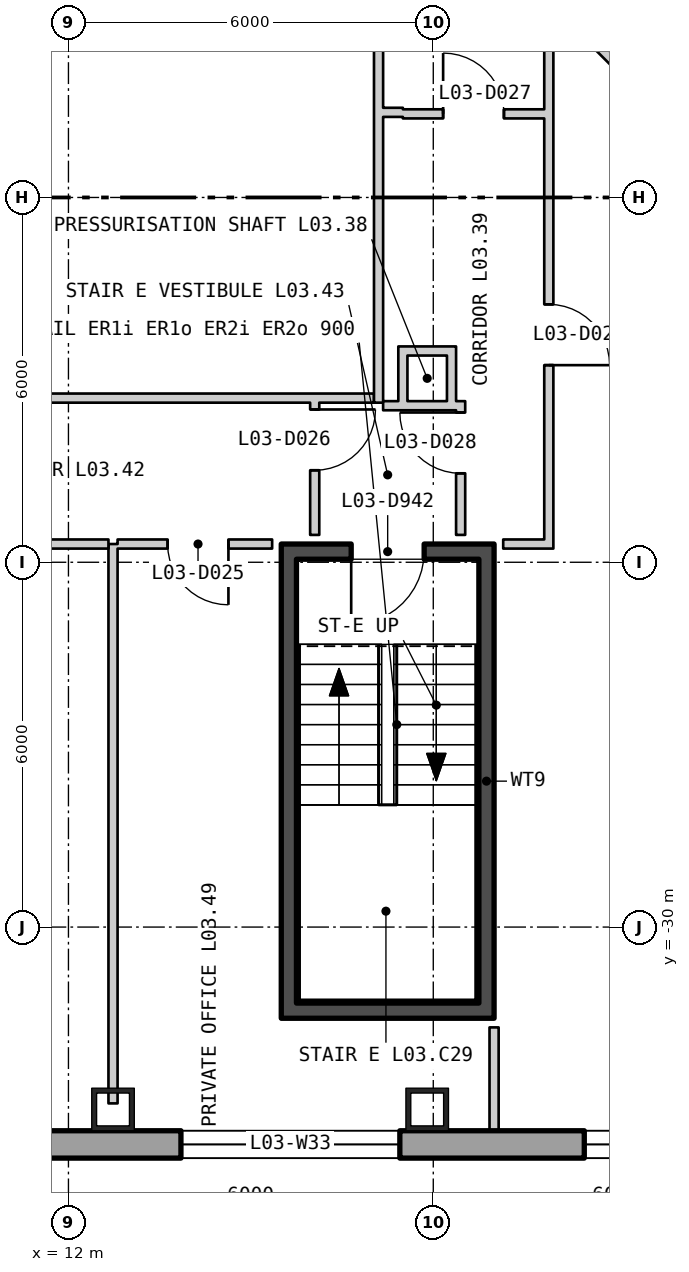
"""IFC4 building model, lengths in metres.
Left out: names, types, materials, properties, quantities, classifications, styles, units other than length and angle.
Written with IfcOpenShell. Run it as: python <this file> out.ifc"""

import sys

from ifc_helpers import new_model, si_unit, direction, frame, frame_2d, origin, origin_2d, place, context, subcontext, project, spatial, polyline, rectangle, hollow_rectangle, outline, extrude, element, fill, save


model = new_model("IFC4")
c1 = context("Model", 3, precision=1e-05, world=origin(), true_north=direction((0.0, 1.0)))
c2 = subcontext(c1, "Body", "Model", "MODEL_VIEW")
j1 = project(units=[si_unit("LENGTHUNIT", "METRE"), si_unit("PLANEANGLEUNIT", "RADIAN")], contexts=[c1])
p1 = place(None, origin())
s1 = spatial("IfcSite", under=j1, at=p1, CompositionType="ELEMENT")
p2 = place(p1, origin())
s2 = spatial("IfcBuilding", under=s1, at=p2, CompositionType="ELEMENT")
p3 = place(p2, frame((0.0, 0.0, 18.6)))
s3 = spatial("IfcBuildingStorey", under=s2, at=p3, CompositionType="ELEMENT", Elevation=18.6)
for number, where, z_axis, x_axis in (
    (1, (12.733, -33.0, 0.0), (0.0, 0.0, 1.0), (1.0, 0.0, 0.0)),
    (2, (17.9, -33.0, 0.0), (0.0, 0.0, 1.0), (1.0, 0.0, 0.0)),
):
    element("IfcColumn", number, at=place(p3, frame(where, z_axis=z_axis, x_axis=x_axis)), inside=s3, PredefinedType="COLUMN", context=c2, shape_type="SweptSolid", body=[
        extrude(hollow_rectangle(XDim=0.7, YDim=0.7, WallThickness=0.08, at=origin_2d()), origin(), (0.0, 0.0, 1.0), 5.1),
    ])
p4 = place(p3, frame((-38.775, -33.575, -0.4), z_axis=(0.0, 0.0, 1.0), x_axis=(1.0, 0.0, 0.0)))
e3 = element("IfcWall", 3, at=p4, inside=s3, PredefinedType="SOLIDWALL", context=c2, shape_type="SweptSolid", body=[
    extrude(outline(polyline([(-0.225, -0.225), (77.775, -0.225), (77.325, 0.225), (0.225, 0.225), (-0.225, -0.225)])), origin(), (0.0, 0.0, 1.0), 5.1),
])
p5 = place(p4, frame((1.958, 0.0, 1.3)))
e4 = element("IfcOpeningElement", 4, at=p5, cuts=e3, PredefinedType="OPENING", context=c2, shape_type="SweptSolid", body=[
    extrude(rectangle(XDim=3.6, YDim=3.2, at=frame_2d((1.8, 1.6))), frame((0.0, 0.235, 0.0), z_axis=(0.0, -1.0, 0.0), x_axis=(1.0, 0.0, 0.0)), (0.0, 0.0, 1.0), 0.47),
])
p6 = place(p4, frame((8.325, 0.0, 1.3)))
e5 = element("IfcOpeningElement", 5, at=p6, cuts=e3, PredefinedType="OPENING", context=c2, shape_type="SweptSolid", body=[
    extrude(rectangle(XDim=3.6, YDim=3.2, at=frame_2d((1.8, 1.6))), frame((0.0, 0.235, 0.0), z_axis=(0.0, -1.0, 0.0), x_axis=(1.0, 0.0, 0.0)), (0.0, 0.0, 1.0), 0.47),
])
p7 = place(p4, frame((14.692, 0.0, 1.3)))
e6 = element("IfcOpeningElement", 6, at=p7, cuts=e3, PredefinedType="OPENING", context=c2, shape_type="SweptSolid", body=[
    extrude(rectangle(XDim=3.6, YDim=3.2, at=frame_2d((1.8, 1.6))), frame((0.0, 0.235, 0.0), z_axis=(0.0, -1.0, 0.0), x_axis=(1.0, 0.0, 0.0)), (0.0, 0.0, 1.0), 0.47),
])
p8 = place(p4, frame((21.325, 0.0, 1.3)))
e7 = element("IfcOpeningElement", 7, at=p8, cuts=e3, PredefinedType="OPENING", context=c2, shape_type="SweptSolid", body=[
    extrude(rectangle(XDim=3.6, YDim=3.2, at=frame_2d((1.8, 1.6))), frame((0.0, 0.235, 0.0), z_axis=(0.0, -1.0, 0.0), x_axis=(1.0, 0.0, 0.0)), (0.0, 0.0, 1.0), 0.47),
])
p9 = place(p4, frame((27.425, 0.0, 1.3)))
e8 = element("IfcOpeningElement", 8, at=p9, cuts=e3, PredefinedType="OPENING", context=c2, shape_type="SweptSolid", body=[
    extrude(rectangle(XDim=3.6, YDim=3.2, at=frame_2d((1.8, 1.6))), frame((0.0, 0.235, 0.0), z_axis=(0.0, -1.0, 0.0), x_axis=(1.0, 0.0, 0.0)), (0.0, 0.0, 1.0), 0.47),
])
p10 = place(p4, frame((33.792, 0.0, 1.3)))
e9 = element("IfcOpeningElement", 9, at=p10, cuts=e3, PredefinedType="OPENING", context=c2, shape_type="SweptSolid", body=[
    extrude(rectangle(XDim=3.6, YDim=3.2, at=frame_2d((1.8, 1.6))), frame((0.0, 0.235, 0.0), z_axis=(0.0, -1.0, 0.0), x_axis=(1.0, 0.0, 0.0)), (0.0, 0.0, 1.0), 0.47),
])
p11 = place(p4, frame((40.158, 0.0, 1.3)))
e10 = element("IfcOpeningElement", 10, at=p11, cuts=e3, PredefinedType="OPENING", context=c2, shape_type="SweptSolid", body=[
    extrude(rectangle(XDim=3.6, YDim=3.2, at=frame_2d((1.8, 1.6))), frame((0.0, 0.235, 0.0), z_axis=(0.0, -1.0, 0.0), x_axis=(1.0, 0.0, 0.0)), (0.0, 0.0, 1.0), 0.47),
])
p12 = place(p4, frame((46.525, 0.0, 1.3)))
e11 = element("IfcOpeningElement", 11, at=p12, cuts=e3, PredefinedType="OPENING", context=c2, shape_type="SweptSolid", body=[
    extrude(rectangle(XDim=3.6, YDim=3.2, at=frame_2d((1.8, 1.6))), frame((0.0, 0.235, 0.0), z_axis=(0.0, -1.0, 0.0), x_axis=(1.0, 0.0, 0.0)), (0.0, 0.0, 1.0), 0.47),
])
p13 = place(p4, frame((52.625, 0.0, 1.3)))
e12 = element("IfcOpeningElement", 12, at=p13, cuts=e3, PredefinedType="OPENING", context=c2, shape_type="SweptSolid", body=[
    extrude(rectangle(XDim=3.6, YDim=3.2, at=frame_2d((1.8, 1.6))), frame((0.0, 0.235, 0.0), z_axis=(0.0, -1.0, 0.0), x_axis=(1.0, 0.0, 0.0)), (0.0, 0.0, 1.0), 0.47),
])
p14 = place(p4, frame((59.258, 0.0, 1.3)))
e13 = element("IfcOpeningElement", 13, at=p14, cuts=e3, PredefinedType="OPENING", context=c2, shape_type="SweptSolid", body=[
    extrude(rectangle(XDim=3.6, YDim=3.2, at=frame_2d((1.8, 1.6))), frame((0.0, 0.235, 0.0), z_axis=(0.0, -1.0, 0.0), x_axis=(1.0, 0.0, 0.0)), (0.0, 0.0, 1.0), 0.47),
])
p15 = place(p4, frame((65.625, 0.0, 1.3)))
e14 = element("IfcOpeningElement", 14, at=p15, cuts=e3, PredefinedType="OPENING", context=c2, shape_type="SweptSolid", body=[
    extrude(rectangle(XDim=3.6, YDim=3.2, at=frame_2d((1.8, 1.6))), frame((0.0, 0.235, 0.0), z_axis=(0.0, -1.0, 0.0), x_axis=(1.0, 0.0, 0.0)), (0.0, 0.0, 1.0), 0.47),
])
p16 = place(p4, frame((71.992, 0.0, 1.3)))
e15 = element("IfcOpeningElement", 15, at=p16, cuts=e3, PredefinedType="OPENING", context=c2, shape_type="SweptSolid", body=[
    extrude(rectangle(XDim=3.6, YDim=3.2, at=frame_2d((1.8, 1.6))), frame((0.0, 0.235, 0.0), z_axis=(0.0, -1.0, 0.0), x_axis=(1.0, 0.0, 0.0)), (0.0, 0.0, 1.0), 0.47),
])
for number, where, z_axis, x_axis in (
    (16, (15.625, -31.25, 0.0), (0.0, 0.0, 1.0), (0.0, 1.0, 0.0)),
    (17, (18.875, -31.25, 0.0), (0.0, 0.0, 1.0), (0.0, 1.0, 0.0)),
):
    element("IfcWall", number, at=place(p3, frame(where, z_axis=z_axis, x_axis=x_axis)), inside=s3, PredefinedType="SHEAR", context=c2, shape_type="SweptSolid", body=[
        extrude(rectangle(XDim=7.3, YDim=0.25, at=frame_2d((3.65, 0.0))), origin(), (0.0, 0.0, 1.0), 4.88),
    ])
p17 = place(p3, frame((15.5, -31.375, 0.0), z_axis=(0.0, 0.0, 1.0), x_axis=(1.0, 0.0, 0.0)))
e18 = element("IfcWall", 18, at=p17, inside=s3, PredefinedType="SHEAR", context=c2, shape_type="SweptSolid", body=[
    extrude(rectangle(XDim=3.5, YDim=0.25, at=frame_2d((1.75, 0.0))), origin(), (0.0, 0.0, 1.0), 4.88),
])
p18 = place(p3, frame((15.5, -23.825, 0.0), z_axis=(0.0, 0.0, 1.0), x_axis=(1.0, 0.0, 0.0)))
e19 = element("IfcWall", 19, at=p18, inside=s3, PredefinedType="SHEAR", context=c2, shape_type="SweptSolid", body=[
    extrude(rectangle(XDim=3.5, YDim=0.25, at=frame_2d((1.75, 0.0))), origin(), (0.0, 0.0, 1.0), 4.88),
])
p19 = place(p18, frame((1.15, 0.0, 0.0)))
e20 = element("IfcOpeningElement", 20, at=p19, cuts=e19, PredefinedType="OPENING", context=c2, shape_type="SweptSolid", body=[
    extrude(rectangle(XDim=1.2, YDim=2.1, at=frame_2d((0.6, 1.05))), frame((0.0, 0.135, 0.0), z_axis=(0.0, -1.0, 0.0), x_axis=(1.0, 0.0, 0.0)), (0.0, 0.0, 1.0), 0.27),
])
p20 = place(p3, frame((1.7, -21.3, 0.0), z_axis=(0.0, 0.0, 1.0), x_axis=(1.0, 0.0, 0.0)))
e21 = element("IfcWall", 21, at=p20, inside=s3, PredefinedType="PARTITIONING", context=c2, shape_type="SweptSolid", body=[
    extrude(rectangle(XDim=15.325, YDim=0.15, at=frame_2d((7.662, 0.0))), origin(), (0.0, 0.0, 1.0), 4.88),
])
p21 = place(p3, frame((6.442, -23.7, 0.0), z_axis=(0.0, 0.0, 1.0), x_axis=(1.0, 0.0, 0.0)))
e22 = element("IfcWall", 22, at=p21, inside=s3, PredefinedType="PARTITIONING", context=c2, shape_type="SweptSolid", body=[
    extrude(rectangle(XDim=6.216, YDim=0.15, at=frame_2d((3.108, 0.0))), origin(), (0.0, 0.0, 1.0), 4.88),
])
p22 = place(p21, frame((0.903, 0.0, 0.0)))
e23 = element("IfcOpeningElement", 23, at=p22, cuts=e22, PredefinedType="OPENING", context=c2, shape_type="SweptSolid", body=[
    extrude(rectangle(XDim=1.8, YDim=2.1, at=frame_2d((0.9, 1.05))), frame((0.0, 0.085, 0.0), z_axis=(0.0, -1.0, 0.0), x_axis=(1.0, 0.0, 0.0)), (0.0, 0.0, 1.0), 0.17),
])
p23 = place(p3, frame((12.733, -32.9, 0.0), z_axis=(0.0, 0.0, 1.0), x_axis=(0.0, 1.0, 0.0)))
e24 = element("IfcWall", 24, at=p23, inside=s3, PredefinedType="PARTITIONING", context=c2, shape_type="SweptSolid", body=[
    extrude(rectangle(XDim=9.2, YDim=0.15, at=frame_2d((4.6, 0.0))), origin(), (0.0, 0.0, 1.0), 4.19),
])
p24 = place(p3, frame((12.808, -23.7, 0.0), z_axis=(0.0, 0.0, 1.0), x_axis=(1.0, 0.0, 0.0)))
e25 = element("IfcWall", 25, at=p24, inside=s3, PredefinedType="PARTITIONING", context=c2, shape_type="SweptSolid", body=[
    extrude(rectangle(XDim=2.542, YDim=0.15, at=frame_2d((1.271, 0.0))), origin(), (0.0, 0.0, 1.0), 4.88),
])
p25 = place(p24, frame((0.823, 0.0, 0.0)))
e26 = element("IfcOpeningElement", 26, at=p25, cuts=e25, PredefinedType="OPENING", context=c2, shape_type="SweptSolid", body=[
    extrude(rectangle(XDim=1.0, YDim=2.1, at=frame_2d((0.5, 1.05))), frame((0.0, 0.085, 0.0), z_axis=(0.0, -1.0, 0.0), x_axis=(1.0, 0.0, 0.0)), (0.0, 0.0, 1.0), 0.17),
])
p26 = place(p3, frame((16.05, -23.55, 0.0), z_axis=(0.0, 0.0, 1.0), x_axis=(0.0, 1.0, 0.0)))
e27 = element("IfcWall", 27, at=p26, inside=s3, PredefinedType="PARTITIONING", context=c2, shape_type="SweptSolid", body=[
    extrude(rectangle(XDim=2.175, YDim=0.15, at=frame_2d((1.087, 0.0))), origin(), (0.0, 0.0, 1.0), 4.88),
])
p27 = place(p26, frame((1.063, 0.0, 0.0)))
e28 = element("IfcOpeningElement", 28, at=p27, cuts=e27, PredefinedType="OPENING", context=c2, shape_type="SweptSolid", body=[
    extrude(rectangle(XDim=1.0, YDim=2.1, at=frame_2d((0.5, 1.05))), frame((0.0, 0.085, 0.0), z_axis=(0.0, -1.0, 0.0), x_axis=(1.0, 0.0, 0.0)), (0.0, 0.0, 1.0), 0.17),
])
p28 = place(p3, frame((17.1, -21.375, 0.0), z_axis=(0.0, 0.0, 1.0), x_axis=(0.0, 1.0, 0.0)))
e29 = element("IfcWall", 29, at=p28, inside=s3, PredefinedType="PARTITIONING", context=c2, shape_type="SweptSolid", body=[
    extrude(rectangle(XDim=19.05, YDim=0.15, at=frame_2d((9.525, 0.0))), origin(), (0.0, 0.0, 1.0), 4.88),
])
p29 = place(p3, frame((17.175, -21.425, 0.0), z_axis=(0.0, 0.0, 1.0), x_axis=(1.0, 0.0, 0.0)))
e30 = element("IfcWall", 30, at=p29, inside=s3, PredefinedType="PARTITIONING", context=c2, shape_type="SweptSolid", body=[
    extrude(rectangle(XDim=0.25, YDim=0.15, at=frame_2d((0.125, 0.0))), origin(), (0.0, 0.0, 1.0), 4.88),
])
p30 = place(p3, frame((17.175, -16.6, 0.0), z_axis=(0.0, 0.0, 1.0), x_axis=(1.0, 0.0, 0.0)))
e31 = element("IfcWall", 31, at=p30, inside=s3, PredefinedType="PARTITIONING", context=c2, shape_type="SweptSolid", body=[
    extrude(rectangle(XDim=0.325, YDim=0.15, at=frame_2d((0.163, 0.0))), origin(), (0.0, 0.0, 1.0), 4.88),
])
p31 = place(p3, frame((17.5, -21.5, 0.0), z_axis=(0.0, 0.0, 1.0), x_axis=(0.0, 1.0, 0.0)))
e32 = element("IfcWall", 32, at=p31, inside=s3, PredefinedType="PARTITIONING", context=c2, shape_type="SweptSolid", body=[
    extrude(rectangle(XDim=1.05, YDim=0.15, at=frame_2d((0.525, 0.0))), origin(), (0.0, 0.0, 1.0), 4.88),
])
p32 = place(p3, frame((17.5, -16.625, 0.0), z_axis=(0.0, 0.0, 1.0), x_axis=(1.0, 0.0, 0.0)))
e33 = element("IfcWall", 33, at=p32, inside=s3, PredefinedType="PARTITIONING", context=c2, shape_type="SweptSolid", body=[
    extrude(rectangle(XDim=2.325, YDim=0.15, at=frame_2d((1.163, 0.0))), origin(), (0.0, 0.0, 1.0), 4.88),
])
p33 = place(p32, frame((0.662, 0.0, 0.0)))
e34 = element("IfcOpeningElement", 34, at=p33, cuts=e33, PredefinedType="OPENING", context=c2, shape_type="SweptSolid", body=[
    extrude(rectangle(XDim=1.0, YDim=2.1, at=frame_2d((0.5, 1.05))), frame((0.0, 0.085, 0.0), z_axis=(0.0, -1.0, 0.0), x_axis=(1.0, 0.0, 0.0)), (0.0, 0.0, 1.0), 0.17),
])
for number, where, z_axis, x_axis in (
    (35, (17.575, -21.425, 0.0), (0.0, 0.0, 1.0), (1.0, 0.0, 0.0)),
    (36, (17.575, -20.525, 0.0), (0.0, 0.0, 1.0), (1.0, 0.0, 0.0)),
):
    element("IfcWall", number, at=place(p3, frame(where, z_axis=z_axis, x_axis=x_axis)), inside=s3, PredefinedType="PARTITIONING", context=c2, shape_type="SweptSolid", body=[
        extrude(rectangle(XDim=0.65, YDim=0.15, at=frame_2d((0.325, 0.0))), origin(), (0.0, 0.0, 1.0), 4.88),
    ])
p34 = place(p3, frame((18.3, -21.5, 0.0), z_axis=(0.0, 0.0, 1.0), x_axis=(0.0, 1.0, 0.0)))
e37 = element("IfcWall", 37, at=p34, inside=s3, PredefinedType="PARTITIONING", context=c2, shape_type="SweptSolid", body=[
    extrude(rectangle(XDim=1.05, YDim=0.15, at=frame_2d((0.525, 0.0))), origin(), (0.0, 0.0, 1.0), 4.88),
])
p35 = place(p3, frame((18.45, -23.55, 0.0), z_axis=(0.0, 0.0, 1.0), x_axis=(0.0, 1.0, 0.0)))
e38 = element("IfcWall", 38, at=p35, inside=s3, PredefinedType="PARTITIONING", context=c2, shape_type="SweptSolid", body=[
    extrude(rectangle(XDim=2.2, YDim=0.15, at=frame_2d((1.1, 0.0))), origin(), (0.0, 0.0, 1.0), 4.88),
])
p36 = place(p35, frame((1.013, 0.0, 0.0)))
e39 = element("IfcOpeningElement", 39, at=p36, cuts=e38, PredefinedType="OPENING", context=c2, shape_type="SweptSolid", body=[
    extrude(rectangle(XDim=1.0, YDim=2.1, at=frame_2d((0.5, 1.05))), frame((0.0, 0.085, 0.0), z_axis=(0.0, -1.0, 0.0), x_axis=(1.0, 0.0, 0.0)), (0.0, 0.0, 1.0), 0.17),
])
p37 = place(p3, frame((19.0, -33.348, 0.0), z_axis=(0.0, 0.0, 1.0), x_axis=(0.0, 1.0, 0.0)))
e40 = element("IfcWall", 40, at=p37, inside=s3, PredefinedType="PARTITIONING", context=c2, shape_type="SweptSolid", body=[
    extrude(rectangle(XDim=0.448, YDim=0.15, at=frame_2d((0.224, 0.0))), origin(), (0.0, 0.0, 1.0), 4.88),
])
p38 = place(p3, frame((19.0, -32.9, 0.0), z_axis=(0.0, 0.0, 1.0), x_axis=(0.0, 1.0, 0.0)))
e41 = element("IfcWall", 41, at=p38, inside=s3, PredefinedType="PARTITIONING", context=c2, shape_type="SweptSolid", body=[
    extrude(rectangle(XDim=1.25, YDim=0.15, at=frame_2d((0.625, 0.0))), origin(), (0.0, 0.0, 1.0), 4.19),
])
p39 = place(p3, frame((19.15, -23.7, 0.0), z_axis=(0.0, 0.0, 1.0), x_axis=(1.0, 0.0, 0.0)))
e42 = element("IfcWall", 42, at=p39, inside=s3, PredefinedType="PARTITIONING", context=c2, shape_type="SweptSolid", body=[
    extrude(rectangle(XDim=0.675, YDim=0.15, at=frame_2d((0.338, 0.0))), origin(), (0.0, 0.0, 1.0), 4.88),
])
p40 = place(p3, frame((19.9, -23.775, 0.0), z_axis=(0.0, 0.0, 1.0), x_axis=(0.0, 1.0, 0.0)))
e43 = element("IfcWall", 43, at=p40, inside=s3, PredefinedType="PARTITIONING", context=c2, shape_type="SweptSolid", body=[
    extrude(rectangle(XDim=21.187, YDim=0.15, at=frame_2d((10.594, 0.0))), origin(), (0.0, 0.0, 1.0), 4.88),
])
p41 = place(p40, frame((3.017, 0.0, 0.0)))
e44 = element("IfcOpeningElement", 44, at=p41, cuts=e43, PredefinedType="OPENING", context=c2, shape_type="SweptSolid", body=[
    extrude(rectangle(XDim=1.0, YDim=2.1, at=frame_2d((0.5, 1.05))), frame((0.0, 0.085, 0.0), z_axis=(0.0, -1.0, 0.0), x_axis=(1.0, 0.0, 0.0)), (0.0, 0.0, 1.0), 0.17),
])
p42 = place(p40, frame((12.423, 0.0, 0.0)))
e45 = element("IfcOpeningElement", 45, at=p42, cuts=e43, PredefinedType="OPENING", context=c2, shape_type="SweptSolid", body=[
    extrude(rectangle(XDim=1.0, YDim=2.1, at=frame_2d((0.5, 1.05))), frame((0.0, 0.085, 0.0), z_axis=(0.0, -1.0, 0.0), x_axis=(1.0, 0.0, 0.0)), (0.0, 0.0, 1.0), 0.17),
])
p43 = place(p3, frame((20.028, -14.827, 0.0), z_axis=(0.0, 0.0, 1.0), x_axis=(0.707106781187, -0.707106781187, 0.0)))
e46 = element("IfcWall", 46, at=p43, inside=s3, PredefinedType="PARTITIONING", context=c2, shape_type="SweptSolid", body=[
    extrude(rectangle(XDim=7.068, YDim=0.15, at=frame_2d((3.534, 0.0))), origin(), (0.0, 0.0, 1.0), 4.88),
])
p44 = place(p13, origin())
e47 = element("IfcWindow", 47, at=p44, inside=s3, PartitioningType="SINGLE_PANEL", PredefinedType="WINDOW", context=c2, shape_type="SweptSolid", body=[
    extrude(rectangle(XDim=3.6, YDim=3.2, at=frame_2d((1.8, 1.6))), frame((0.0, 0.105, 0.0), z_axis=(0.0, -1.0, 0.0), x_axis=(1.0, 0.0, 0.0)), (0.0, 0.0, 1.0), 0.06),
])
fill(e12, e47)
p45 = place(p14, origin())
e48 = element("IfcWindow", 48, at=p45, inside=s3, PartitioningType="SINGLE_PANEL", PredefinedType="WINDOW", context=c2, shape_type="SweptSolid", body=[
    extrude(rectangle(XDim=3.6, YDim=3.2, at=frame_2d((1.8, 1.6))), frame((0.0, 0.105, 0.0), z_axis=(0.0, -1.0, 0.0), x_axis=(1.0, 0.0, 0.0)), (0.0, 0.0, 1.0), 0.06),
])
fill(e13, e48)
p46 = place(p19, origin())
e49 = element("IfcDoor", 49, at=p46, inside=s3, OperationType="SINGLE_SWING_LEFT", PredefinedType="DOOR", context=c2, shape_type="SweptSolid", body=[
    extrude(rectangle(XDim=1.2, YDim=2.1, at=frame_2d((0.6, 1.05))), frame((0.0, 0.025, 0.0), z_axis=(0.0, -1.0, 0.0), x_axis=(1.0, 0.0, 0.0)), (0.0, 0.0, 1.0), 0.05),
])
fill(e20, e49)
p47 = place(p25, origin())
e50 = element("IfcDoor", 50, at=p47, inside=s3, OperationType="SINGLE_SWING_RIGHT", PredefinedType="DOOR", context=c2, shape_type="SweptSolid", body=[
    extrude(rectangle(XDim=1.0, YDim=2.1, at=frame_2d((0.5, 1.05))), frame((0.0, 0.025, 0.0), z_axis=(0.0, -1.0, 0.0), x_axis=(1.0, 0.0, 0.0)), (0.0, 0.0, 1.0), 0.05),
])
fill(e26, e50)
p48 = place(p27, origin())
e51 = element("IfcDoor", 51, at=p48, inside=s3, OperationType="SINGLE_SWING_RIGHT", PredefinedType="DOOR", context=c2, shape_type="SweptSolid", body=[
    extrude(rectangle(XDim=1.0, YDim=2.1, at=frame_2d((0.5, 1.05))), frame((0.0, 0.025, 0.0), z_axis=(0.0, -1.0, 0.0), x_axis=(1.0, 0.0, 0.0)), (0.0, 0.0, 1.0), 0.05),
])
fill(e28, e51)
p49 = place(p33, origin())
e52 = element("IfcDoor", 52, at=p49, inside=s3, OperationType="SINGLE_SWING_RIGHT", PredefinedType="DOOR", context=c2, shape_type="SweptSolid", body=[
    extrude(rectangle(XDim=1.0, YDim=2.1, at=frame_2d((0.5, 1.05))), frame((0.0, 0.025, 0.0), z_axis=(0.0, -1.0, 0.0), x_axis=(1.0, 0.0, 0.0)), (0.0, 0.0, 1.0), 0.05),
])
fill(e34, e52)
p50 = place(p36, origin())
e53 = element("IfcDoor", 53, at=p50, inside=s3, OperationType="SINGLE_SWING_LEFT", PredefinedType="DOOR", context=c2, shape_type="SweptSolid", body=[
    extrude(rectangle(XDim=1.0, YDim=2.1, at=frame_2d((0.5, 1.05))), frame((0.0, 0.025, 0.0), z_axis=(0.0, -1.0, 0.0), x_axis=(1.0, 0.0, 0.0)), (0.0, 0.0, 1.0), 0.05),
])
fill(e39, e53)
p51 = place(p41, origin())
e54 = element("IfcDoor", 54, at=p51, inside=s3, OperationType="SINGLE_SWING_LEFT", PredefinedType="DOOR", context=c2, shape_type="SweptSolid", body=[
    extrude(rectangle(XDim=1.0, YDim=2.1, at=frame_2d((0.5, 1.05))), frame((0.0, 0.025, 0.0), z_axis=(0.0, -1.0, 0.0), x_axis=(1.0, 0.0, 0.0)), (0.0, 0.0, 1.0), 0.05),
])
fill(e44, e54)
save(model, sys.argv[1])
